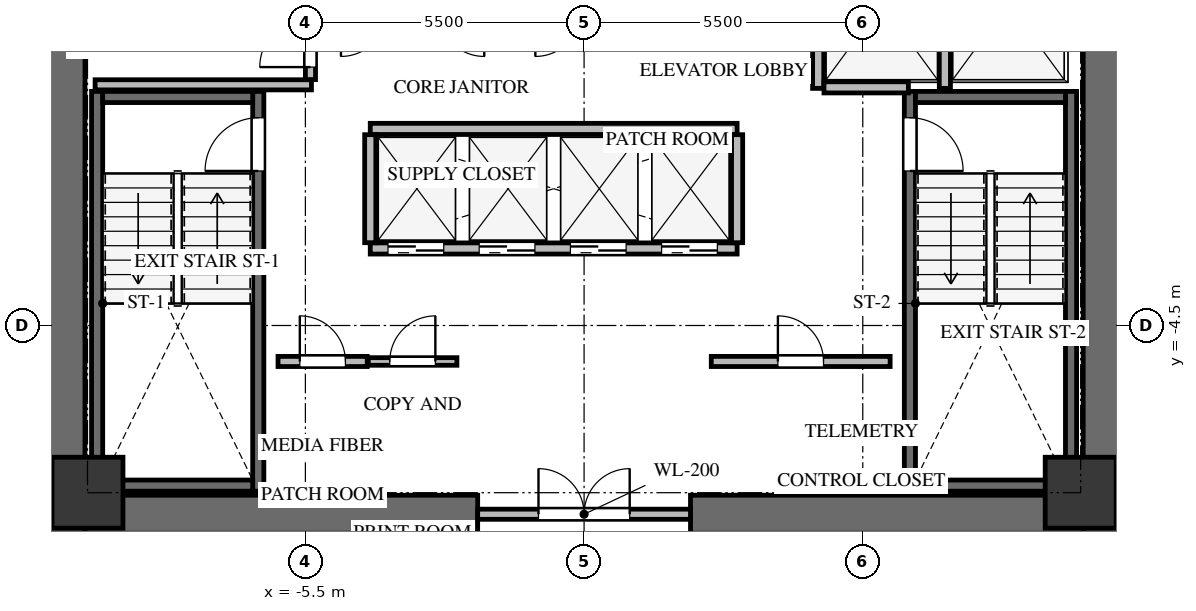
"""IFC4 building model, lengths in metres.
Left out: names, types, materials, properties, quantities, classifications, styles, units other than length and angle.
Written with IfcOpenShell. Run it as: python <this file> out.ifc"""

import sys

from ifc_helpers import new_model, si_unit, direction, frame, frame_2d, origin, origin_2d, place, context, subcontext, project, spatial, rectangle, extrude, source, transform, mapped, element, fill, save


model = new_model("IFC4")
c1 = context("Model", 3, precision=1e-05, world=origin(), true_north=direction((0.0, 1.0)))
c2 = subcontext(c1, "Body", "Model", "MODEL_VIEW")
j1 = project(units=[si_unit("LENGTHUNIT", "METRE"), si_unit("PLANEANGLEUNIT", "RADIAN")], contexts=[c1])
p1 = place(None, origin())
s1 = spatial("IfcSite", under=j1, at=p1, CompositionType="ELEMENT")
p2 = place(p1, origin())
s2 = spatial("IfcBuilding", under=s1, at=p2, CompositionType="ELEMENT")
p3 = place(p2, frame((0.0, 0.0, 133.8)))
s3 = spatial("IfcBuildingStorey", under=s2, at=p3, CompositionType="ELEMENT", Elevation=133.8)
for number, where, z_axis, x_axis in (
    (1, (-10.225, -8.6, 0.0), (0.0, 0.0, 1.0), (0.0, 1.0, 0.0)),
    (2, (10.225, -8.6, 0.0), (0.0, 0.0, 1.0), (0.0, 1.0, 0.0)),
):
    element("IfcWall", number, at=place(p3, frame(where, z_axis=z_axis, x_axis=x_axis)), inside=s3, PredefinedType="SHEAR", context=c2, shape_type="SweptSolid", body=[
        extrude(rectangle(XDim=17.2, YDim=0.75, at=frame_2d((8.6, 0.0))), origin(), (0.0, 0.0, 1.0), 3.3),
    ])
for number, where, z_axis, x_axis in (
    (3, (-9.85, -8.225, 0.0), (0.0, 0.0, 1.0), (1.0, 0.0, 0.0)),
    (4, (2.1, -8.225, 0.0), (0.0, 0.0, 1.0), (1.0, 0.0, 0.0)),
):
    element("IfcWall", number, at=place(p3, frame(where, z_axis=z_axis, x_axis=x_axis)), inside=s3, PredefinedType="SHEAR", context=c2, shape_type="SweptSolid", body=[
        extrude(rectangle(XDim=7.75, YDim=0.75, at=frame_2d((3.875, 0.0))), origin(), (0.0, 0.0, 1.0), 3.3),
    ])
p4 = place(p3, frame((-6.43, -7.77, -0.24), z_axis=(0.0, 0.0, 1.0), x_axis=(0.0, 1.0, 0.0)))
e5 = element("IfcWall", 5, at=p4, inside=s3, PredefinedType="SHEAR", context=c2, shape_type="SweptSolid", body=[
    extrude(rectangle(XDim=7.89, YDim=0.22, at=frame_2d((3.945, 0.0))), origin(), (0.0, 0.0, 1.0), 3.3),
])
p5 = place(p4, frame((6.32, 0.0, 0.0)))
e6 = element("IfcOpeningElement", 6, at=p5, cuts=e5, PredefinedType="OPENING", context=c2, shape_type="SweptSolid", body=[
    extrude(rectangle(XDim=1.05, YDim=2.15, at=frame_2d((0.525, 1.075))), frame((0.0, 0.12, 0.0), z_axis=(0.0, -1.0, 0.0), x_axis=(1.0, 0.0, 0.0)), (0.0, 0.0, 1.0), 0.24),
])
p6 = place(p3, frame((-9.61, 0.12, -0.24), z_axis=(0.0, 0.0, 1.0), x_axis=(0.0, -1.0, 0.0)))
e7 = element("IfcWall", 7, at=p6, inside=s3, PredefinedType="SHEAR", context=c2, shape_type="SweptSolid", body=[
    extrude(rectangle(XDim=7.89, YDim=0.22, at=frame_2d((3.945, 0.0))), origin(), (0.0, 0.0, 1.0), 3.3),
])
for number, where, z_axis, x_axis in (
    (8, (-9.5, -7.66, -0.24), (0.0, 0.0, 1.0), (1.0, 0.0, 0.0)),
    (9, (-6.54, 0.01, -0.24), (0.0, 0.0, 1.0), (-1.0, 0.0, 0.0)),
):
    element("IfcWall", number, at=place(p3, frame(where, z_axis=z_axis, x_axis=x_axis)), inside=s3, PredefinedType="SHEAR", context=c2, shape_type="SweptSolid", body=[
        extrude(rectangle(XDim=2.96, YDim=0.22, at=frame_2d((1.48, 0.0))), origin(), (0.0, 0.0, 1.0), 3.3),
    ])
p7 = place(p3, frame((9.61, -7.77, -0.24), z_axis=(0.0, 0.0, 1.0), x_axis=(0.0, 1.0, 0.0)))
e10 = element("IfcWall", 10, at=p7, inside=s3, PredefinedType="SHEAR", context=c2, shape_type="SweptSolid", body=[
    extrude(rectangle(XDim=7.89, YDim=0.22, at=frame_2d((3.945, 0.0))), origin(), (0.0, 0.0, 1.0), 3.3),
])
p8 = place(p3, frame((6.43, 0.12, -0.24), z_axis=(0.0, 0.0, 1.0), x_axis=(0.0, -1.0, 0.0)))
e11 = element("IfcWall", 11, at=p8, inside=s3, PredefinedType="SHEAR", context=c2, shape_type="SweptSolid", body=[
    extrude(rectangle(XDim=7.89, YDim=0.22, at=frame_2d((3.945, 0.0))), origin(), (0.0, 0.0, 1.0), 3.3),
])
p9 = place(p8, frame((0.52, 0.0, 0.0)))
e12 = element("IfcOpeningElement", 12, at=p9, cuts=e11, PredefinedType="OPENING", context=c2, shape_type="SweptSolid", body=[
    extrude(rectangle(XDim=1.05, YDim=2.15, at=frame_2d((0.525, 1.075))), frame((0.0, 0.12, 0.0), z_axis=(0.0, -1.0, 0.0), x_axis=(1.0, 0.0, 0.0)), (0.0, 0.0, 1.0), 0.24),
])
for number, where, z_axis, x_axis in (
    (13, (6.54, -7.66, -0.24), (0.0, 0.0, 1.0), (1.0, 0.0, 0.0)),
    (14, (9.5, 0.01, -0.24), (0.0, 0.0, 1.0), (-1.0, 0.0, 0.0)),
):
    element("IfcWall", number, at=place(p3, frame(where, z_axis=z_axis, x_axis=x_axis)), inside=s3, PredefinedType="SHEAR", context=c2, shape_type="SweptSolid", body=[
        extrude(rectangle(XDim=2.96, YDim=0.22, at=frame_2d((1.48, 0.0))), origin(), (0.0, 0.0, 1.0), 3.3),
    ])
m1 = source(origin(), c2, "Body", "SweptSolid", [
    extrude(rectangle(XDim=1.4, YDim=1.4, at=origin_2d()), origin(), (0.0, 0.0, 1.0), 3.3),
])
for number, where, z_axis, x_axis in (
    (15, (-9.8, -7.8, -0.24), (0.0, 0.0, 1.0), (1.0, 0.0, 0.0)),
    (16, (9.8, -7.8, -0.24), (0.0, 0.0, 1.0), (1.0, 0.0, 0.0)),
):
    element("IfcColumn", number, at=place(p3, frame(where, z_axis=z_axis, x_axis=x_axis)), inside=s3, PredefinedType="COLUMN", context=c2, shape_type="MappedRepresentation", body=[
        mapped(m1, transform((0.0, 0.0, 0.0), x_axis=(1.0, 0.0, 0.0), y_axis=(0.0, 1.0, 0.0), z_axis=(0.0, 0.0, 1.0), scale=1.0)),
    ])
p10 = place(p3, frame((-2.1, -8.225, 0.0), z_axis=(0.0, 0.0, 1.0), x_axis=(1.0, 0.0, 0.0)))
e17 = element("IfcWall", 17, at=p10, inside=s3, PredefinedType="SOLIDWALL", context=c2, shape_type="SweptSolid", body=[
    extrude(rectangle(XDim=4.2, YDim=0.2, at=frame_2d((2.1, 0.0))), origin(), (0.0, 0.0, 1.0), 3.045),
])
p11 = place(p10, frame((1.2, 0.0, 0.0)))
e18 = element("IfcOpeningElement", 18, at=p11, cuts=e17, PredefinedType="OPENING", context=c2, shape_type="SweptSolid", body=[
    extrude(rectangle(XDim=1.8, YDim=2.15, at=frame_2d((0.9, 1.075))), frame((0.0, 0.11, 0.0), z_axis=(0.0, -1.0, 0.0), x_axis=(1.0, 0.0, 0.0)), (0.0, 0.0, 1.0), 0.22),
])
p12 = place(p3, frame((-9.65, 0.25, 0.0), z_axis=(0.0, 0.0, 1.0), x_axis=(1.0, 0.0, 0.0)))
e19 = element("IfcWall", 19, at=p12, inside=s3, PredefinedType="SOLIDWALL", context=c2, shape_type="SweptSolid", body=[
    extrude(rectangle(XDim=4.27, YDim=0.2, at=frame_2d((2.135, 0.0))), origin(), (0.0, 0.0, 1.0), 3.045),
])
p13 = place(p3, frame((-5.4, 0.354, 0.0), z_axis=(0.0, 0.0, 1.0), x_axis=(0.0, 1.0, 0.0)))
e20 = element("IfcWall", 20, at=p13, inside=s3, PredefinedType="SOLIDWALL", context=c2, shape_type="SweptSolid", body=[
    extrude(rectangle(XDim=4.026, YDim=0.2, at=frame_2d((2.013, 0.0))), origin(), (0.0, 0.0, 1.0), 3.045),
])
p14 = place(p13, frame((0.246, 0.0, 0.0)))
e21 = element("IfcOpeningElement", 21, at=p14, cuts=e20, PredefinedType="OPENING", context=c2, shape_type="SweptSolid", body=[
    extrude(rectangle(XDim=1.0, YDim=2.15, at=frame_2d((0.5, 1.075))), frame((0.0, 0.11, 0.0), z_axis=(0.0, -1.0, 0.0), x_axis=(1.0, 0.0, 0.0)), (0.0, 0.0, 1.0), 0.22),
])
for number, where, z_axis, x_axis in (
    (22, (4.62, 0.18, 0.0), (0.0, 0.0, 1.0), (0.0, 1.0, 0.0)),
    (23, (7.12, 0.18, 0.0), (0.0, 0.0, 1.0), (0.0, 1.0, 0.0)),
):
    element("IfcWall", number, at=place(p3, frame(where, z_axis=z_axis, x_axis=x_axis)), inside=s3, PredefinedType="SOLIDWALL", context=c2, shape_type="SweptSolid", body=[
        extrude(rectangle(XDim=3.186, YDim=0.22, at=frame_2d((1.593, 0.0))), origin(), (0.0, 0.0, 1.0), 3.045),
    ])
p15 = place(p3, frame((4.734, 0.2, 0.0), z_axis=(0.0, 0.0, 1.0), x_axis=(1.0, 0.0, 0.0)))
e24 = element("IfcWall", 24, at=p15, inside=s3, PredefinedType="SOLIDWALL", context=c2, shape_type="SweptSolid", body=[
    extrude(rectangle(XDim=1.666, YDim=0.22, at=frame_2d((0.833, 0.0))), origin(), (0.0, 0.0, 1.0), 3.045),
])
p16 = place(p3, frame((-4.22, -2.98, 0.0), z_axis=(0.0, 0.0, 1.0), x_axis=(1.0, 0.0, 0.0)))
e25 = element("IfcWall", 25, at=p16, inside=s3, PredefinedType="SOLIDWALL", context=c2, shape_type="SweptSolid", body=[
    extrude(rectangle(XDim=7.24, YDim=0.22, at=frame_2d((3.62, 0.0))), origin(), (0.0, 0.0, 1.0), 3.045),
])
p17 = place(p16, frame((0.35, 0.0, 0.0)))
e26 = element("IfcOpeningElement", 26, at=p17, cuts=e25, PredefinedType="OPENING", context=c2, shape_type="SweptSolid", body=[
    extrude(rectangle(XDim=1.1, YDim=2.15, at=frame_2d((0.55, 1.075))), frame((0.0, 0.12, 0.0), z_axis=(0.0, -1.0, 0.0), x_axis=(1.0, 0.0, 0.0)), (0.0, 0.0, 1.0), 0.24),
])
p18 = place(p16, frame((2.15, 0.0, 0.0)))
e27 = element("IfcOpeningElement", 27, at=p18, cuts=e25, PredefinedType="OPENING", context=c2, shape_type="SweptSolid", body=[
    extrude(rectangle(XDim=1.1, YDim=2.15, at=frame_2d((0.55, 1.075))), frame((0.0, 0.12, 0.0), z_axis=(0.0, -1.0, 0.0), x_axis=(1.0, 0.0, 0.0)), (0.0, 0.0, 1.0), 0.24),
])
p19 = place(p16, frame((3.95, 0.0, 0.0)))
e28 = element("IfcOpeningElement", 28, at=p19, cuts=e25, PredefinedType="OPENING", context=c2, shape_type="SweptSolid", body=[
    extrude(rectangle(XDim=1.1, YDim=2.15, at=frame_2d((0.55, 1.075))), frame((0.0, 0.12, 0.0), z_axis=(0.0, -1.0, 0.0), x_axis=(1.0, 0.0, 0.0)), (0.0, 0.0, 1.0), 0.24),
])
p20 = place(p16, frame((5.75, 0.0, 0.0)))
e29 = element("IfcOpeningElement", 29, at=p20, cuts=e25, PredefinedType="OPENING", context=c2, shape_type="SweptSolid", body=[
    extrude(rectangle(XDim=1.1, YDim=2.15, at=frame_2d((0.55, 1.075))), frame((0.0, 0.12, 0.0), z_axis=(0.0, -1.0, 0.0), x_axis=(1.0, 0.0, 0.0)), (0.0, 0.0, 1.0), 0.24),
])
p21 = place(p3, frame((-4.22, -0.62, 0.0), z_axis=(0.0, 0.0, 1.0), x_axis=(1.0, 0.0, 0.0)))
e30 = element("IfcWall", 30, at=p21, inside=s3, PredefinedType="SOLIDWALL", context=c2, shape_type="SweptSolid", body=[
    extrude(rectangle(XDim=7.24, YDim=0.22, at=frame_2d((3.62, 0.0))), origin(), (0.0, 0.0, 1.0), 3.045),
])
for number, where, z_axis, x_axis in (
    (31, (-4.22, -2.866, 0.0), (0.0, 0.0, 1.0), (0.0, 1.0, 0.0)),
    (32, (3.02, -2.866, 0.0), (0.0, 0.0, 1.0), (0.0, 1.0, 0.0)),
):
    element("IfcWall", number, at=place(p3, frame(where, z_axis=z_axis, x_axis=x_axis)), inside=s3, PredefinedType="SOLIDWALL", context=c2, shape_type="SweptSolid", body=[
        extrude(rectangle(XDim=2.132, YDim=0.22, at=frame_2d((1.066, 0.0))), origin(), (0.0, 0.0, 1.0), 3.045),
    ])
p22 = place(p3, frame((-6.04, -5.21, 0.0), z_axis=(0.0, 0.0, 1.0), x_axis=(1.0, 0.0, 0.0)))
e33 = element("IfcWall", 33, at=p22, inside=s3, PredefinedType="SOLIDWALL", context=c2, shape_type="SweptSolid", body=[
    extrude(rectangle(XDim=1.76, YDim=0.2, at=frame_2d((0.88, 0.0))), origin(), (0.0, 0.0, 1.0), 3.045),
])
p23 = place(p22, frame((0.43, 0.0, 0.0)))
e34 = element("IfcOpeningElement", 34, at=p23, cuts=e33, PredefinedType="OPENING", context=c2, shape_type="SweptSolid", body=[
    extrude(rectangle(XDim=0.9, YDim=2.05, at=frame_2d((0.45, 1.025))), frame((0.0, 0.11, 0.0), z_axis=(0.0, -1.0, 0.0), x_axis=(1.0, 0.0, 0.0)), (0.0, 0.0, 1.0), 0.22),
])
p24 = place(p3, frame((-4.26, -5.21, 0.0), z_axis=(0.0, 0.0, 1.0), x_axis=(1.0, 0.0, 0.0)))
e35 = element("IfcWall", 35, at=p24, inside=s3, PredefinedType="PARTITIONING", context=c2, shape_type="SweptSolid", body=[
    extrude(rectangle(XDim=1.75, YDim=0.15, at=frame_2d((0.875, 0.0))), origin(), (0.0, 0.0, 1.0), 3.045),
])
p25 = place(p24, frame((0.425, 0.0, 0.0)))
e36 = element("IfcOpeningElement", 36, at=p25, cuts=e35, PredefinedType="OPENING", context=c2, shape_type="SweptSolid", body=[
    extrude(rectangle(XDim=0.9, YDim=2.05, at=frame_2d((0.45, 1.025))), frame((0.0, 0.085, 0.0), z_axis=(0.0, -1.0, 0.0), x_axis=(1.0, 0.0, 0.0)), (0.0, 0.0, 1.0), 0.17),
])
p26 = place(p3, frame((2.51, -5.21, 0.0), z_axis=(0.0, 0.0, 1.0), x_axis=(1.0, 0.0, 0.0)))
e37 = element("IfcWall", 37, at=p26, inside=s3, PredefinedType="SOLIDWALL", context=c2, shape_type="SweptSolid", body=[
    extrude(rectangle(XDim=3.53, YDim=0.2, at=frame_2d((1.765, 0.0))), origin(), (0.0, 0.0, 1.0), 3.045),
])
p27 = place(p26, frame((1.315, 0.0, 0.0)))
e38 = element("IfcOpeningElement", 38, at=p27, cuts=e37, PredefinedType="OPENING", context=c2, shape_type="SweptSolid", body=[
    extrude(rectangle(XDim=0.9, YDim=2.05, at=frame_2d((0.45, 1.025))), frame((0.0, 0.11, 0.0), z_axis=(0.0, -1.0, 0.0), x_axis=(1.0, 0.0, 0.0)), (0.0, 0.0, 1.0), 0.22),
])
m2 = source(origin(), c2, "Body", "SweptSolid", [
    extrude(rectangle(XDim=1.05, YDim=2.15, at=frame_2d((0.525, 1.075))), frame((0.0, 0.025, 0.0), z_axis=(0.0, -1.0, 0.0), x_axis=(1.0, 0.0, 0.0)), (0.0, 0.0, 1.0), 0.05),
])
p28 = place(p5, origin())
e39 = element("IfcDoor", 39, at=p28, inside=s3, OperationType="SINGLE_SWING_LEFT", PredefinedType="DOOR", context=c2, shape_type="MappedRepresentation", body=[
    mapped(m2, transform((0.0, 0.0, 0.0), x_axis=(1.0, 0.0, 0.0), y_axis=(0.0, 1.0, 0.0), z_axis=(0.0, 0.0, 1.0), scale=1.0)),
])
fill(e6, e39)
m3 = source(origin(), c2, "Body", "SweptSolid", [
    extrude(rectangle(XDim=1.05, YDim=2.15, at=frame_2d((0.525, 1.075))), frame((0.0, 0.025, 0.0), z_axis=(0.0, -1.0, 0.0), x_axis=(1.0, 0.0, 0.0)), (0.0, 0.0, 1.0), 0.05),
])
p29 = place(p9, origin())
e40 = element("IfcDoor", 40, at=p29, inside=s3, OperationType="SINGLE_SWING_RIGHT", PredefinedType="DOOR", context=c2, shape_type="MappedRepresentation", body=[
    mapped(m3, transform((0.0, 0.0, 0.0), x_axis=(1.0, 0.0, 0.0), y_axis=(0.0, 1.0, 0.0), z_axis=(0.0, 0.0, 1.0), scale=1.0)),
])
fill(e12, e40)
m4 = source(origin(), c2, "Body", "SweptSolid", [
    extrude(rectangle(XDim=1.8, YDim=2.15, at=frame_2d((0.9, 1.075))), frame((0.0, 0.025, 0.0), z_axis=(0.0, -1.0, 0.0), x_axis=(1.0, 0.0, 0.0)), (0.0, 0.0, 1.0), 0.05),
])
p30 = place(p11, origin())
e41 = element("IfcDoor", 41, at=p30, inside=s3, OperationType="DOUBLE_DOOR_SINGLE_SWING", PredefinedType="DOOR", context=c2, shape_type="MappedRepresentation", body=[
    mapped(m4, transform((0.0, 0.0, 0.0), x_axis=(1.0, 0.0, 0.0), y_axis=(0.0, 1.0, 0.0), z_axis=(0.0, 0.0, 1.0), scale=1.0)),
])
fill(e18, e41)
m5 = source(origin(), c2, "Body", "SweptSolid", [
    extrude(rectangle(XDim=1.0, YDim=2.15, at=frame_2d((0.5, 1.075))), frame((0.0, 0.025, 0.0), z_axis=(0.0, -1.0, 0.0), x_axis=(1.0, 0.0, 0.0)), (0.0, 0.0, 1.0), 0.05),
])
p31 = place(p14, origin())
e42 = element("IfcDoor", 42, at=p31, inside=s3, OperationType="SINGLE_SWING_LEFT", PredefinedType="DOOR", context=c2, shape_type="MappedRepresentation", body=[
    mapped(m5, transform((0.0, 0.0, 0.0), x_axis=(1.0, 0.0, 0.0), y_axis=(0.0, 1.0, 0.0), z_axis=(0.0, 0.0, 1.0), scale=1.0)),
])
fill(e21, e42)
m6 = source(origin(), c2, "Body", "SweptSolid", [
    extrude(rectangle(XDim=1.1, YDim=2.15, at=frame_2d((0.55, 1.075))), frame((0.0, 0.025, 0.0), z_axis=(0.0, -1.0, 0.0), x_axis=(1.0, 0.0, 0.0)), (0.0, 0.0, 1.0), 0.05),
])
p32 = place(p17, origin())
e43 = element("IfcDoor", 43, at=p32, inside=s3, OperationType="DOUBLE_DOOR_SLIDING", PredefinedType="DOOR", context=c2, shape_type="MappedRepresentation", body=[
    mapped(m6, transform((0.0, 0.0, 0.0), x_axis=(1.0, 0.0, 0.0), y_axis=(0.0, 1.0, 0.0), z_axis=(0.0, 0.0, 1.0), scale=1.0)),
])
fill(e26, e43)
p33 = place(p18, origin())
e44 = element("IfcDoor", 44, at=p33, inside=s3, OperationType="DOUBLE_DOOR_SLIDING", PredefinedType="DOOR", context=c2, shape_type="MappedRepresentation", body=[
    mapped(m6, transform((0.0, 0.0, 0.0), x_axis=(1.0, 0.0, 0.0), y_axis=(0.0, 1.0, 0.0), z_axis=(0.0, 0.0, 1.0), scale=1.0)),
])
fill(e27, e44)
p34 = place(p19, origin())
e45 = element("IfcDoor", 45, at=p34, inside=s3, OperationType="DOUBLE_DOOR_SLIDING", PredefinedType="DOOR", context=c2, shape_type="MappedRepresentation", body=[
    mapped(m6, transform((0.0, 0.0, 0.0), x_axis=(1.0, 0.0, 0.0), y_axis=(0.0, 1.0, 0.0), z_axis=(0.0, 0.0, 1.0), scale=1.0)),
])
fill(e28, e45)
p35 = place(p20, origin())
e46 = element("IfcDoor", 46, at=p35, inside=s3, OperationType="DOUBLE_DOOR_SLIDING", PredefinedType="DOOR", context=c2, shape_type="MappedRepresentation", body=[
    mapped(m6, transform((0.0, 0.0, 0.0), x_axis=(1.0, 0.0, 0.0), y_axis=(0.0, 1.0, 0.0), z_axis=(0.0, 0.0, 1.0), scale=1.0)),
])
fill(e29, e46)
m7 = source(origin(), c2, "Body", "SweptSolid", [
    extrude(rectangle(XDim=0.9, YDim=2.05, at=frame_2d((0.45, 1.025))), frame((0.0, 0.025, 0.0), z_axis=(0.0, -1.0, 0.0), x_axis=(1.0, 0.0, 0.0)), (0.0, 0.0, 1.0), 0.05),
])
p36 = place(p23, origin())
e47 = element("IfcDoor", 47, at=p36, inside=s3, OperationType="SINGLE_SWING_LEFT", PredefinedType="DOOR", context=c2, shape_type="MappedRepresentation", body=[
    mapped(m7, transform((0.0, 0.0, 0.0), x_axis=(1.0, 0.0, 0.0), y_axis=(0.0, 1.0, 0.0), z_axis=(0.0, 0.0, 1.0), scale=1.0)),
])
fill(e34, e47)
m8 = source(origin(), c2, "Body", "SweptSolid", [
    extrude(rectangle(XDim=0.9, YDim=2.05, at=frame_2d((0.45, 1.025))), frame((0.0, 0.025, 0.0), z_axis=(0.0, -1.0, 0.0), x_axis=(1.0, 0.0, 0.0)), (0.0, 0.0, 1.0), 0.05),
])
p37 = place(p25, origin())
e48 = element("IfcDoor", 48, at=p37, inside=s3, OperationType="SINGLE_SWING_RIGHT", PredefinedType="DOOR", context=c2, shape_type="MappedRepresentation", body=[
    mapped(m8, transform((0.0, 0.0, 0.0), x_axis=(1.0, 0.0, 0.0), y_axis=(0.0, 1.0, 0.0), z_axis=(0.0, 0.0, 1.0), scale=1.0)),
])
fill(e36, e48)
p38 = place(p27, origin())
e49 = element("IfcDoor", 49, at=p38, inside=s3, OperationType="SINGLE_SWING_LEFT", PredefinedType="DOOR", context=c2, shape_type="MappedRepresentation", body=[
    mapped(m7, transform((0.0, 0.0, 0.0), x_axis=(1.0, 0.0, 0.0), y_axis=(0.0, 1.0, 0.0), z_axis=(0.0, 0.0, 1.0), scale=1.0)),
])
fill(e38, e49)
save(model, sys.argv[1])
